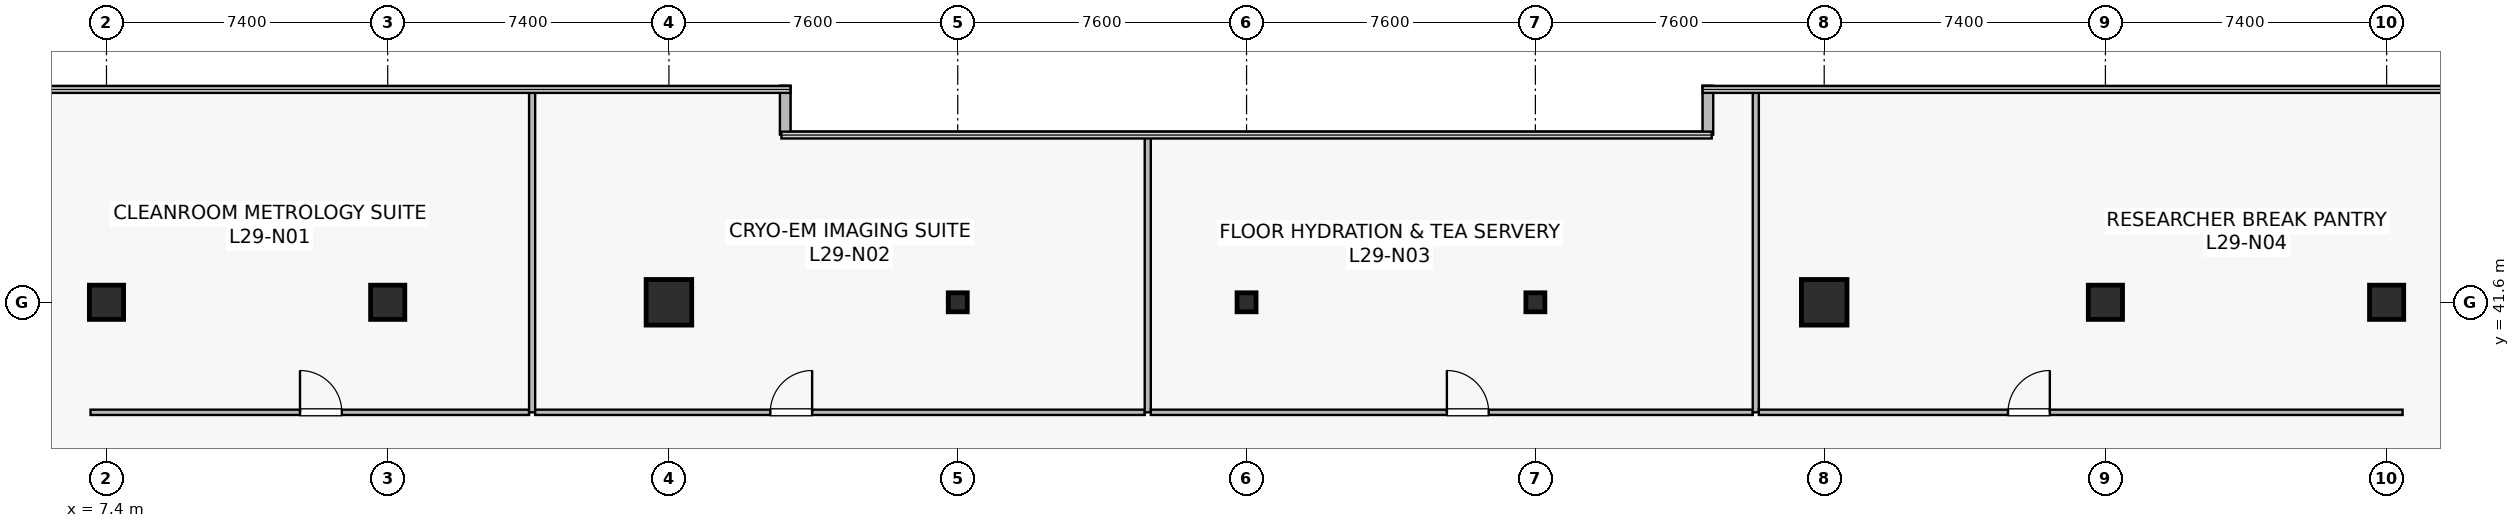
"""IFC4 building model, lengths in metres.
Left out: names, types, materials, properties, quantities, classifications, styles, units other than length and angle.
Written with IfcOpenShell. Run it as: python <this file> out.ifc"""

import sys

from ifc_helpers import new_model, si_unit, direction, frame, frame_2d, origin, origin_2d, place, context, subcontext, project, spatial, rectangle, hollow_rectangle, extrude, source, transform, mapped, element, fill, save


model = new_model("IFC4")
c1 = context("Model", 3, precision=1e-05, world=origin(), true_north=direction((0.0, 1.0)))
c2 = subcontext(c1, "Body", "Model", "MODEL_VIEW")
j1 = project(units=[si_unit("LENGTHUNIT", "METRE"), si_unit("PLANEANGLEUNIT", "RADIAN")], contexts=[c1])
p1 = place(None, origin())
s1 = spatial("IfcSite", under=j1, at=p1, CompositionType="ELEMENT")
p2 = place(p1, origin())
s2 = spatial("IfcBuilding", under=s1, at=p2, CompositionType="ELEMENT")
p3 = place(p2, frame((0.0, 0.0, 121.5)))
s3 = spatial("IfcBuildingStorey", under=s2, at=p3, CompositionType="ELEMENT", Elevation=121.5)
m1 = source(origin(), c2, "Body", "SweptSolid", [
    extrude(rectangle(XDim=0.9, YDim=0.9, at=origin_2d()), origin(), (0.0, 0.0, 1.0), 4.1),
])
p4 = place(p3, frame((14.8, 41.6, 0.0), z_axis=(0.0, 0.0, 1.0), x_axis=(1.0, 0.0, 0.0)))
e1 = element("IfcColumn", 1, at=p4, inside=s3, PredefinedType="COLUMN", context=c2, shape_type="MappedRepresentation", body=[
    mapped(m1, transform((0.0, 0.0, 0.0), scale=1.0)),
])
m2 = source(origin(), c2, "Body", "SweptSolid", [
    extrude(rectangle(XDim=1.2, YDim=1.2, at=origin_2d()), origin(), (0.0, 0.0, 1.0), 4.1),
])
for number, where, z_axis, x_axis in (
    (2, (22.2, 41.6, 0.0), (0.0, 0.0, 1.0), (1.0, 0.0, 0.0)),
    (3, (52.6, 41.6, 0.0), (0.0, 0.0, 1.0), (1.0, 0.0, 0.0)),
):
    element("IfcColumn", number, at=place(p3, frame(where, z_axis=z_axis, x_axis=x_axis)), inside=s3, PredefinedType="COLUMN", context=c2, shape_type="MappedRepresentation", body=[
        mapped(m2, transform((0.0, 0.0, 0.0), scale=1.0)),
    ])
for number, where, z_axis, x_axis in (
    (4, (60.0, 41.6, 0.0), (0.0, 0.0, 1.0), (1.0, 0.0, 0.0)),
    (5, (7.4, 41.6, 0.0), (0.0, 0.0, 1.0), (1.0, 0.0, 0.0)),
    (6, (67.4, 41.6, 0.0), (0.0, 0.0, 1.0), (1.0, 0.0, 0.0)),
):
    element("IfcColumn", number, at=place(p3, frame(where, z_axis=z_axis, x_axis=x_axis)), inside=s3, PredefinedType="COLUMN", context=c2, shape_type="MappedRepresentation", body=[
        mapped(m1, transform((0.0, 0.0, 0.0), scale=1.0)),
    ])
m3 = source(origin(), c2, "Body", "SweptSolid", [
    extrude(hollow_rectangle(XDim=0.5, YDim=0.5, WallThickness=0.022, at=origin_2d()), origin(), (0.0, 0.0, 1.0), 4.1),
])
for number, where, z_axis, x_axis in (
    (7, (29.8, 41.6, 0.0), (0.0, 0.0, 1.0), (1.0, 0.0, 0.0)),
    (8, (37.4, 41.6, 0.0), (0.0, 0.0, 1.0), (1.0, 0.0, 0.0)),
    (9, (45.0, 41.6, 0.0), (0.0, 0.0, 1.0), (1.0, 0.0, 0.0)),
):
    element("IfcColumn", number, at=place(p3, frame(where, z_axis=z_axis, x_axis=x_axis)), inside=s3, PredefinedType="COLUMN", context=c2, shape_type="MappedRepresentation", body=[
        mapped(m3, transform((0.0, 0.0, 0.0), scale=1.0)),
    ])
for number, where, z_axis, x_axis in (
    (10, (49.54, 47.3, 0.0), (0.0, 0.0, 1.0), (0.0, -1.0, 0.0)),
    (11, (25.26, 46.012, 0.0), (0.0, 0.0, 1.0), (0.0, 1.0, 0.0)),
):
    element("IfcWall", number, at=place(p3, frame(where, z_axis=z_axis, x_axis=x_axis)), inside=s3, PredefinedType="STANDARD", context=c2, shape_type="SweptSolid", body=[
        extrude(rectangle(XDim=1.288, YDim=0.28, at=frame_2d((0.644, 0.0))), origin(), (0.0, 0.0, 1.0), 3.79),
    ])
p5 = place(p3, frame((6.98, 38.705, 0.0), z_axis=(0.0, 0.0, 1.0), x_axis=(1.0, 0.0, 0.0)))
e12 = element("IfcWall", 12, at=p5, inside=s3, PredefinedType="PARTITIONING", context=c2, shape_type="SweptSolid", body=[
    extrude(rectangle(XDim=11.54, YDim=0.14, at=frame_2d((5.77, 0.0))), origin(), (0.0, 0.0, 1.0), 3.125),
])
p6 = place(p5, frame((5.512, 0.0, 0.0)))
e13 = element("IfcOpeningElement", 13, at=p6, cuts=e12, PredefinedType="OPENING", context=c2, shape_type="SweptSolid", body=[
    extrude(rectangle(XDim=1.1, YDim=2.18, at=frame_2d((0.55, 1.09))), frame((0.0, 0.08, 0.0), z_axis=(0.0, -1.0, 0.0), x_axis=(1.0, 0.0, 0.0)), (0.0, 0.0, 1.0), 0.16),
])
p7 = place(p3, frame((18.6, 38.705, 0.0), z_axis=(0.0, 0.0, 1.0), x_axis=(0.0, 1.0, 0.0)))
e14 = element("IfcWall", 14, at=p7, inside=s3, PredefinedType="PARTITIONING", context=c2, shape_type="SweptSolid", body=[
    extrude(rectangle(XDim=8.485, YDim=0.16, at=frame_2d((4.242, 0.0))), origin(), (0.0, 0.0, 1.0), 3.075),
])
p8 = place(p3, frame((18.68, 38.705, 0.0), z_axis=(0.0, 0.0, 1.0), x_axis=(1.0, 0.0, 0.0)))
e15 = element("IfcWall", 15, at=p8, inside=s3, PredefinedType="PARTITIONING", context=c2, shape_type="SweptSolid", body=[
    extrude(rectangle(XDim=16.04, YDim=0.14, at=frame_2d((8.02, 0.0))), origin(), (0.0, 0.0, 1.0), 3.125),
])
p9 = place(p8, frame((6.188, 0.0, 0.0)))
e16 = element("IfcOpeningElement", 16, at=p9, cuts=e15, PredefinedType="OPENING", context=c2, shape_type="SweptSolid", body=[
    extrude(rectangle(XDim=1.1, YDim=2.18, at=frame_2d((0.55, 1.09))), frame((0.0, 0.08, 0.0), z_axis=(0.0, -1.0, 0.0), x_axis=(1.0, 0.0, 0.0)), (0.0, 0.0, 1.0), 0.16),
])
p10 = place(p3, frame((34.8, 38.705, 0.0), z_axis=(0.0, 0.0, 1.0), x_axis=(0.0, 1.0, 0.0)))
e17 = element("IfcWall", 17, at=p10, inside=s3, PredefinedType="PARTITIONING", context=c2, shape_type="SweptSolid", body=[
    extrude(rectangle(XDim=7.285, YDim=0.16, at=frame_2d((3.643, 0.0))), origin(), (0.0, 0.0, 1.0), 3.075),
])
p11 = place(p3, frame((34.88, 38.705, 0.0), z_axis=(0.0, 0.0, 1.0), x_axis=(1.0, 0.0, 0.0)))
e18 = element("IfcWall", 18, at=p11, inside=s3, PredefinedType="PARTITIONING", context=c2, shape_type="SweptSolid", body=[
    extrude(rectangle(XDim=15.84, YDim=0.14, at=frame_2d((7.92, 0.0))), origin(), (0.0, 0.0, 1.0), 3.125),
])
p12 = place(p11, frame((7.791, 0.0, 0.0)))
e19 = element("IfcOpeningElement", 19, at=p12, cuts=e18, PredefinedType="OPENING", context=c2, shape_type="SweptSolid", body=[
    extrude(rectangle(XDim=1.1, YDim=2.18, at=frame_2d((0.55, 1.09))), frame((0.0, 0.08, 0.0), z_axis=(0.0, -1.0, 0.0), x_axis=(1.0, 0.0, 0.0)), (0.0, 0.0, 1.0), 0.16),
])
p13 = place(p3, frame((50.8, 38.705, 0.0), z_axis=(0.0, 0.0, 1.0), x_axis=(0.0, 1.0, 0.0)))
e20 = element("IfcWall", 20, at=p13, inside=s3, PredefinedType="PARTITIONING", context=c2, shape_type="SweptSolid", body=[
    extrude(rectangle(XDim=8.485, YDim=0.16, at=frame_2d((4.242, 0.0))), origin(), (0.0, 0.0, 1.0), 3.075),
])
p14 = place(p3, frame((50.88, 38.705, 0.0), z_axis=(0.0, 0.0, 1.0), x_axis=(1.0, 0.0, 0.0)))
e21 = element("IfcWall", 21, at=p14, inside=s3, PredefinedType="PARTITIONING", context=c2, shape_type="SweptSolid", body=[
    extrude(rectangle(XDim=16.94, YDim=0.14, at=frame_2d((8.47, 0.0))), origin(), (0.0, 0.0, 1.0), 3.125),
])
p15 = place(p14, frame((6.557, 0.0, 0.0)))
e22 = element("IfcOpeningElement", 22, at=p15, cuts=e21, PredefinedType="OPENING", context=c2, shape_type="SweptSolid", body=[
    extrude(rectangle(XDim=1.1, YDim=2.18, at=frame_2d((0.55, 1.09))), frame((0.0, 0.08, 0.0), z_axis=(0.0, -1.0, 0.0), x_axis=(1.0, 0.0, 0.0)), (0.0, 0.0, 1.0), 0.16),
])
m4 = source(origin(), c2, "Body", "SweptSolid", [
    extrude(rectangle(XDim=1.1, YDim=2.18, at=frame_2d((0.55, 1.09))), frame((0.0, 0.025, 0.0), z_axis=(0.0, -1.0, 0.0), x_axis=(1.0, 0.0, 0.0)), (0.0, 0.0, 1.0), 0.05),
])
p16 = place(p6, origin())
e23 = element("IfcDoor", 23, at=p16, inside=s3, OperationType="SINGLE_SWING_LEFT", PredefinedType="DOOR", context=c2, shape_type="MappedRepresentation", body=[
    mapped(m4, transform((0.0, 0.0, 0.0), scale=1.0)),
])
fill(e13, e23)
p17 = place(p9, origin())
e24 = element("IfcDoor", 24, at=p17, inside=s3, OperationType="SINGLE_SWING_RIGHT", PredefinedType="DOOR", context=c2, shape_type="MappedRepresentation", body=[
    mapped(m4, transform((0.0, 0.0, 0.0), scale=1.0)),
])
fill(e16, e24)
p18 = place(p12, origin())
e25 = element("IfcDoor", 25, at=p18, inside=s3, OperationType="SINGLE_SWING_LEFT", PredefinedType="DOOR", context=c2, shape_type="MappedRepresentation", body=[
    mapped(m4, transform((0.0, 0.0, 0.0), scale=1.0)),
])
fill(e19, e25)
p19 = place(p15, origin())
e26 = element("IfcDoor", 26, at=p19, inside=s3, OperationType="SINGLE_SWING_RIGHT", PredefinedType="DOOR", context=c2, shape_type="MappedRepresentation", body=[
    mapped(m4, transform((0.0, 0.0, 0.0), scale=1.0)),
])
fill(e22, e26)
save(model, sys.argv[1])
